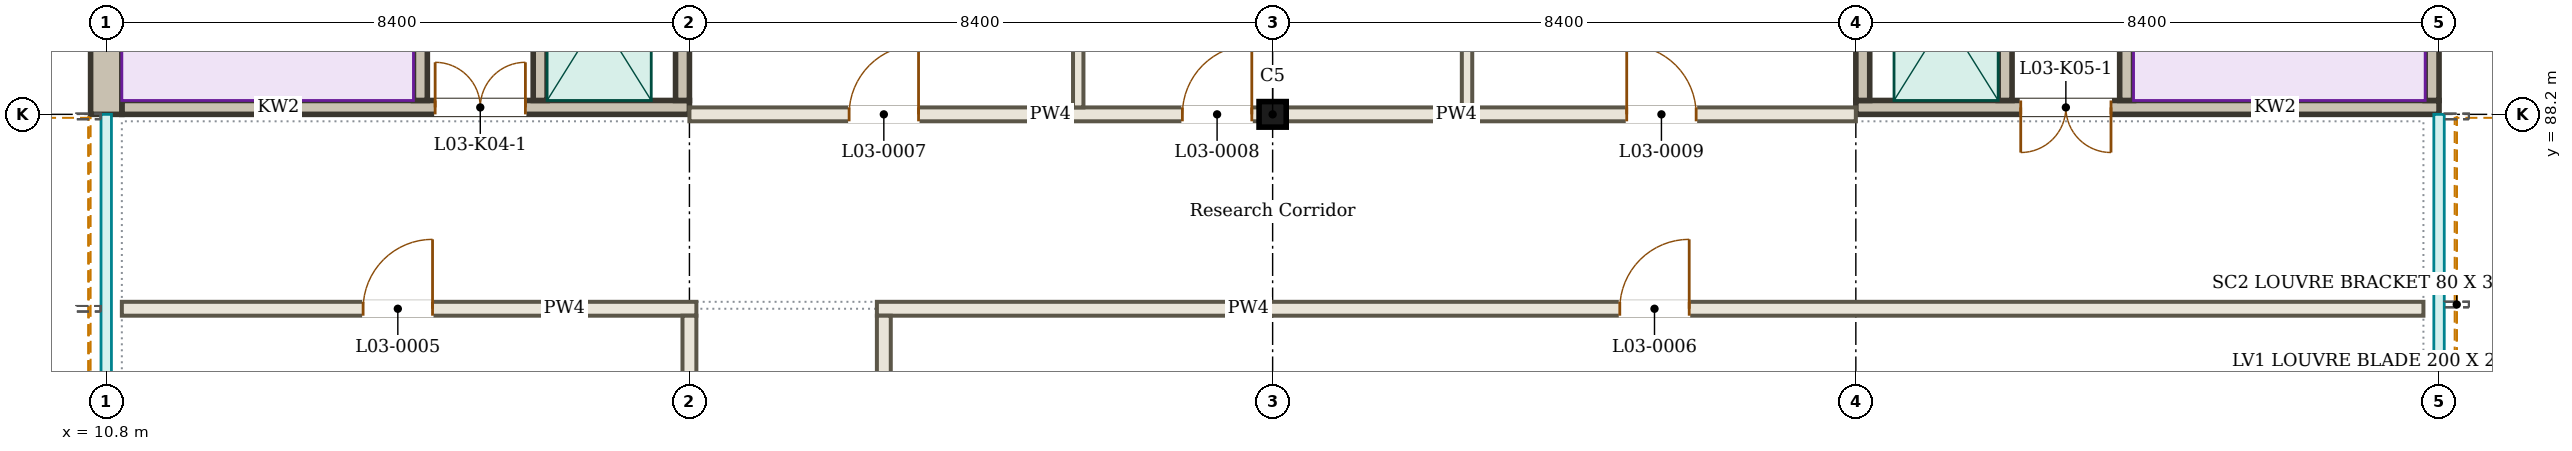
"""IFC4 building model, lengths in metres.
Left out: names, types, materials, properties, quantities, classifications, styles, units other than length and angle.
Written with IfcOpenShell. Run it as: python <this file> out.ifc"""

import sys

from ifc_helpers import new_model, si_unit, direction, frame, frame_2d, origin, origin_2d, place, context, subcontext, project, spatial, rectangle, i_section, extrude, element, fill, save


model = new_model("IFC4")
c1 = context("Model", 3, precision=1e-05, world=origin(), true_north=direction((0.0, 1.0)))
c2 = subcontext(c1, "Body", "Model", "MODEL_VIEW")
j1 = project(units=[si_unit("LENGTHUNIT", "METRE"), si_unit("PLANEANGLEUNIT", "RADIAN")], contexts=[c1])
p1 = place(None, origin())
s1 = spatial("IfcSite", under=j1, at=p1, CompositionType="ELEMENT")
p2 = place(p1, origin())
s2 = spatial("IfcBuilding", under=s1, at=p2, CompositionType="ELEMENT")
p3 = place(p2, frame((0.0, 0.0, 13.5)))
s3 = spatial("IfcBuildingStorey", under=s2, at=p3, CompositionType="ELEMENT", Elevation=13.5)
p4 = place(p3, frame((27.6, 88.2, 0.0), z_axis=(0.0, 0.0, 1.0), x_axis=(1.0, 0.0, 0.0)))
e1 = element("IfcColumn", 1, at=p4, inside=s3, PredefinedType="COLUMN", context=c2, shape_type="SweptSolid", body=[
    extrude(i_section(OverallWidth=0.391, OverallDepth=0.368, WebThickness=0.015, FlangeThickness=0.024, FilletRadius=0.027, at=origin_2d()), origin(), (0.0, 0.0, 1.0), 4.5),
])
p5 = place(p3, frame((44.56, 79.984, 3.87), z_axis=(0.0, 0.0, 1.0), x_axis=(0.0, 1.0, 0.0)))
e2 = element("IfcWall", 2, at=p5, inside=s3, PredefinedType="SOLIDWALL", context=c2, shape_type="SweptSolid", body=[
    extrude(rectangle(XDim=8.216, YDim=0.13, at=frame_2d((4.108, 0.0))), origin(), (0.0, 0.0, 1.0), 0.63),
])
p6 = place(p3, frame((10.64, 79.8, 3.87), z_axis=(0.0, 0.0, 1.0), x_axis=(0.0, 1.0, 0.0)))
e3 = element("IfcWall", 3, at=p6, inside=s3, PredefinedType="SOLIDWALL", context=c2, shape_type="SweptSolid", body=[
    extrude(rectangle(XDim=8.4, YDim=0.13, at=frame_2d((4.2, 0.0))), origin(), (0.0, 0.0, 1.0), 0.63),
])
p7 = place(p3, frame((11.025, 85.4, 0.0), z_axis=(0.0, 0.0, 1.0), x_axis=(1.0, 0.0, 0.0)))
e4 = element("IfcWall", 4, at=p7, inside=s3, PredefinedType="PARTITIONING", context=c2, shape_type="SweptSolid", body=[
    extrude(rectangle(XDim=8.275, YDim=0.2, at=frame_2d((4.138, 0.0))), origin(), (0.0, 0.0, 1.0), 3.8),
])
p8 = place(p7, frame((3.475, 0.0, 0.0)))
e5 = element("IfcOpeningElement", 5, at=p8, cuts=e4, PredefinedType="OPENING", context=c2, shape_type="SweptSolid", body=[
    extrude(rectangle(XDim=1.0, YDim=2.1, at=frame_2d((0.5, 1.05))), frame((0.0, 0.11, 0.0), z_axis=(0.0, -1.0, 0.0), x_axis=(1.0, 0.0, 0.0)), (0.0, 0.0, 1.0), 0.22),
])
p9 = place(p3, frame((21.9, 85.4, 0.0), z_axis=(0.0, 0.0, 1.0), x_axis=(1.0, 0.0, 0.0)))
e6 = element("IfcWall", 6, at=p9, inside=s3, PredefinedType="PARTITIONING", context=c2, shape_type="SweptSolid", body=[
    extrude(rectangle(XDim=22.275, YDim=0.2, at=frame_2d((11.138, 0.0))), origin(), (0.0, 0.0, 1.0), 3.8),
])
p10 = place(p9, frame((10.7, 0.0, 0.0)))
e7 = element("IfcOpeningElement", 7, at=p10, cuts=e6, PredefinedType="OPENING", context=c2, shape_type="SweptSolid", body=[
    extrude(rectangle(XDim=1.0, YDim=2.1, at=frame_2d((0.5, 1.05))), frame((0.0, 0.11, 0.0), z_axis=(0.0, -1.0, 0.0), x_axis=(1.0, 0.0, 0.0)), (0.0, 0.0, 1.0), 0.22),
])
p11 = place(p3, frame((19.2, 88.2, 0.0), z_axis=(0.0, 0.0, 1.0), x_axis=(1.0, 0.0, 0.0)))
e8 = element("IfcWall", 8, at=p11, inside=s3, PredefinedType="PARTITIONING", context=c2, shape_type="SweptSolid", body=[
    extrude(rectangle(XDim=8.205, YDim=0.2, at=frame_2d((4.102, 0.0))), origin(), (0.0, 0.0, 1.0), 3.8),
])
p12 = place(p11, frame((2.3, 0.0, 0.0)))
e9 = element("IfcOpeningElement", 9, at=p12, cuts=e8, PredefinedType="OPENING", context=c2, shape_type="SweptSolid", body=[
    extrude(rectangle(XDim=1.0, YDim=2.1, at=frame_2d((0.5, 1.05))), frame((0.0, 0.11, 0.0), z_axis=(0.0, -1.0, 0.0), x_axis=(1.0, 0.0, 0.0)), (0.0, 0.0, 1.0), 0.22),
])
p13 = place(p11, frame((7.1, 0.0, 0.0)))
e10 = element("IfcOpeningElement", 10, at=p13, cuts=e8, PredefinedType="OPENING", context=c2, shape_type="SweptSolid", body=[
    extrude(rectangle(XDim=1.0, YDim=2.1, at=frame_2d((0.5, 1.05))), frame((0.0, 0.11, 0.0), z_axis=(0.0, -1.0, 0.0), x_axis=(1.0, 0.0, 0.0)), (0.0, 0.0, 1.0), 0.22),
])
p14 = place(p3, frame((27.795, 88.2, 0.0), z_axis=(0.0, 0.0, 1.0), x_axis=(1.0, 0.0, 0.0)))
e11 = element("IfcWall", 11, at=p14, inside=s3, PredefinedType="PARTITIONING", context=c2, shape_type="SweptSolid", body=[
    extrude(rectangle(XDim=8.205, YDim=0.2, at=frame_2d((4.102, 0.0))), origin(), (0.0, 0.0, 1.0), 3.8),
])
p15 = place(p14, frame((4.905, 0.0, 0.0)))
e12 = element("IfcOpeningElement", 12, at=p15, cuts=e11, PredefinedType="OPENING", context=c2, shape_type="SweptSolid", body=[
    extrude(rectangle(XDim=1.0, YDim=2.1, at=frame_2d((0.5, 1.05))), frame((0.0, 0.11, 0.0), z_axis=(0.0, -1.0, 0.0), x_axis=(1.0, 0.0, 0.0)), (0.0, 0.0, 1.0), 0.22),
])
p16 = place(p3, frame((19.2, 82.7, 0.0), z_axis=(0.0, 0.0, 1.0), x_axis=(0.0, 1.0, 0.0)))
e13 = element("IfcWall", 13, at=p16, inside=s3, PredefinedType="PARTITIONING", context=c2, shape_type="SweptSolid", body=[
    extrude(rectangle(XDim=2.6, YDim=0.2, at=frame_2d((1.3, 0.0))), origin(), (0.0, 0.0, 1.0), 3.8),
])
p17 = place(p3, frame((22.0, 79.875, 0.0), z_axis=(0.0, 0.0, 1.0), x_axis=(0.0, 1.0, 0.0)))
e14 = element("IfcWall", 14, at=p17, inside=s3, PredefinedType="PARTITIONING", context=c2, shape_type="SweptSolid", body=[
    extrude(rectangle(XDim=5.425, YDim=0.2, at=frame_2d((2.712, 0.0))), origin(), (0.0, 0.0, 1.0), 3.8),
])
for number, where, z_axis, x_axis in (
    (15, (24.8, 88.3, 0.0), (0.0, 0.0, 1.0), (0.0, 1.0, 0.0)),
    (16, (30.4, 88.3, 0.0), (0.0, 0.0, 1.0), (0.0, 1.0, 0.0)),
):
    element("IfcWall", number, at=place(p3, frame(where, z_axis=z_axis, x_axis=x_axis)), inside=s3, PredefinedType="PARTITIONING", context=c2, shape_type="SweptSolid", body=[
        extrude(rectangle(XDim=8.075, YDim=0.15, at=frame_2d((4.038, 0.0))), origin(), (0.0, 0.0, 1.0), 3.8),
    ])
p18 = place(p3, frame((11.025, 88.3, 0.0), z_axis=(0.0, 0.0, 1.0), x_axis=(1.0, 0.0, 0.0)))
e17 = element("IfcWall", 17, at=p18, inside=s3, PredefinedType="SOLIDWALL", context=c2, shape_type="SweptSolid", body=[
    extrude(rectangle(XDim=8.175, YDim=0.2, at=frame_2d((4.087, 0.0))), origin(), (0.0, 0.0, 1.0), 4.5),
])
p19 = place(p18, frame((4.512, 0.0, 0.0)))
e18 = element("IfcOpeningElement", 18, at=p19, cuts=e17, PredefinedType="OPENING", context=c2, shape_type="SweptSolid", body=[
    extrude(rectangle(XDim=1.3, YDim=2.1, at=frame_2d((0.65, 1.05))), frame((0.0, 0.11, 0.0), z_axis=(0.0, -1.0, 0.0), x_axis=(1.0, 0.0, 0.0)), (0.0, 0.0, 1.0), 0.22),
])
p20 = place(p3, frame((10.8, 88.2, 0.0), z_axis=(0.0, 0.0, 1.0), x_axis=(0.0, 1.0, 0.0)))
e19 = element("IfcWall", 19, at=p20, inside=s3, PredefinedType="SOLIDWALL", context=c2, shape_type="SweptSolid", body=[
    extrude(rectangle(XDim=8.175, YDim=0.45, at=frame_2d((4.087, 0.0))), origin(), (0.0, 0.0, 1.0), 4.5),
])
p21 = place(p3, frame((19.1, 88.4, 0.0), z_axis=(0.0, 0.0, 1.0), x_axis=(0.0, 1.0, 0.0)))
e20 = element("IfcWall", 20, at=p21, inside=s3, PredefinedType="SOLIDWALL", context=c2, shape_type="SweptSolid", body=[
    extrude(rectangle(XDim=7.975, YDim=0.2, at=frame_2d((3.988, 0.0))), origin(), (0.0, 0.0, 1.0), 4.5),
])
p22 = place(p3, frame((15.325, 88.4, 0.0), z_axis=(0.0, 0.0, 1.0), x_axis=(0.0, 1.0, 0.0)))
e21 = element("IfcWall", 21, at=p22, inside=s3, PredefinedType="SOLIDWALL", context=c2, shape_type="SweptSolid", body=[
    extrude(rectangle(XDim=7.975, YDim=0.2, at=frame_2d((3.988, 0.0))), origin(), (0.0, 0.0, 1.0), 4.5),
])
p23 = place(p22, frame((6.538, 0.0, 0.0)))
e22 = element("IfcOpeningElement", 22, at=p23, cuts=e21, PredefinedType="OPENING", context=c2, shape_type="SweptSolid", body=[
    extrude(rectangle(XDim=1.1, YDim=2.1, at=frame_2d((0.55, 1.05))), frame((0.0, 0.11, 0.0), z_axis=(0.0, -1.0, 0.0), x_axis=(1.0, 0.0, 0.0)), (0.0, 0.0, 1.0), 0.22),
])
p24 = place(p3, frame((17.05, 88.4, 0.0), z_axis=(0.0, 0.0, 1.0), x_axis=(0.0, 1.0, 0.0)))
e23 = element("IfcWall", 23, at=p24, inside=s3, PredefinedType="SOLIDWALL", context=c2, shape_type="SweptSolid", body=[
    extrude(rectangle(XDim=2.95, YDim=0.2, at=frame_2d((1.475, 0.0))), origin(), (0.0, 0.0, 1.0), 4.5),
])
p25 = place(p3, frame((44.4, 88.3, 0.0), z_axis=(0.0, 0.0, 1.0), x_axis=(-1.0, 0.0, 0.0)))
e24 = element("IfcWall", 24, at=p25, inside=s3, PredefinedType="SOLIDWALL", context=c2, shape_type="SweptSolid", body=[
    extrude(rectangle(XDim=8.4, YDim=0.2, at=frame_2d((4.2, 0.0))), origin(), (0.0, 0.0, 1.0), 4.5),
])
p26 = place(p25, frame((4.725, 0.0, 0.0)))
e25 = element("IfcOpeningElement", 25, at=p26, cuts=e24, PredefinedType="OPENING", context=c2, shape_type="SweptSolid", body=[
    extrude(rectangle(XDim=1.3, YDim=2.1, at=frame_2d((0.65, 1.05))), frame((0.0, 0.11, 0.0), z_axis=(0.0, -1.0, 0.0), x_axis=(1.0, 0.0, 0.0)), (0.0, 0.0, 1.0), 0.22),
])
for number, where, z_axis, x_axis in (
    (26, (44.3, 88.4, 0.0), (0.0, 0.0, 1.0), (0.0, 1.0, 0.0)),
    (27, (36.1, 88.4, 0.0), (0.0, 0.0, 1.0), (0.0, 1.0, 0.0)),
):
    element("IfcWall", number, at=place(p3, frame(where, z_axis=z_axis, x_axis=x_axis)), inside=s3, PredefinedType="SOLIDWALL", context=c2, shape_type="SweptSolid", body=[
        extrude(rectangle(XDim=7.975, YDim=0.2, at=frame_2d((3.988, 0.0))), origin(), (0.0, 0.0, 1.0), 4.5),
    ])
p27 = place(p3, frame((39.9, 88.4, 0.0), z_axis=(0.0, 0.0, 1.0), x_axis=(0.0, 1.0, 0.0)))
e28 = element("IfcWall", 28, at=p27, inside=s3, PredefinedType="SOLIDWALL", context=c2, shape_type="SweptSolid", body=[
    extrude(rectangle(XDim=7.975, YDim=0.2, at=frame_2d((3.988, 0.0))), origin(), (0.0, 0.0, 1.0), 4.5),
])
p28 = place(p27, frame((6.538, 0.0, 0.0)))
e29 = element("IfcOpeningElement", 29, at=p28, cuts=e28, PredefinedType="OPENING", context=c2, shape_type="SweptSolid", body=[
    extrude(rectangle(XDim=1.1, YDim=2.1, at=frame_2d((0.55, 1.05))), frame((0.0, 0.11, 0.0), z_axis=(0.0, -1.0, 0.0), x_axis=(1.0, 0.0, 0.0)), (0.0, 0.0, 1.0), 0.22),
])
p29 = place(p3, frame((38.15, 88.4, 0.0), z_axis=(0.0, 0.0, 1.0), x_axis=(0.0, 1.0, 0.0)))
e30 = element("IfcWall", 30, at=p29, inside=s3, PredefinedType="SOLIDWALL", context=c2, shape_type="SweptSolid", body=[
    extrude(rectangle(XDim=2.95, YDim=0.2, at=frame_2d((1.475, 0.0))), origin(), (0.0, 0.0, 1.0), 4.5),
])
p30 = place(p8, origin())
e31 = element("IfcDoor", 31, at=p30, inside=s3, OperationType="SINGLE_SWING_RIGHT", PredefinedType="DOOR", context=c2, shape_type="SweptSolid", body=[
    extrude(rectangle(XDim=1.0, YDim=2.1, at=frame_2d((0.5, 1.05))), frame((0.0, 0.025, 0.0), z_axis=(0.0, -1.0, 0.0), x_axis=(1.0, 0.0, 0.0)), (0.0, 0.0, 1.0), 0.05),
])
fill(e5, e31)
p31 = place(p10, origin())
e32 = element("IfcDoor", 32, at=p31, inside=s3, OperationType="SINGLE_SWING_RIGHT", PredefinedType="DOOR", context=c2, shape_type="SweptSolid", body=[
    extrude(rectangle(XDim=1.0, YDim=2.1, at=frame_2d((0.5, 1.05))), frame((0.0, 0.025, 0.0), z_axis=(0.0, -1.0, 0.0), x_axis=(1.0, 0.0, 0.0)), (0.0, 0.0, 1.0), 0.05),
])
fill(e7, e32)
p32 = place(p12, origin())
e33 = element("IfcDoor", 33, at=p32, inside=s3, OperationType="SINGLE_SWING_RIGHT", PredefinedType="DOOR", context=c2, shape_type="SweptSolid", body=[
    extrude(rectangle(XDim=1.0, YDim=2.1, at=frame_2d((0.5, 1.05))), frame((0.0, 0.025, 0.0), z_axis=(0.0, -1.0, 0.0), x_axis=(1.0, 0.0, 0.0)), (0.0, 0.0, 1.0), 0.05),
])
fill(e9, e33)
p33 = place(p13, origin())
e34 = element("IfcDoor", 34, at=p33, inside=s3, OperationType="SINGLE_SWING_RIGHT", PredefinedType="DOOR", context=c2, shape_type="SweptSolid", body=[
    extrude(rectangle(XDim=1.0, YDim=2.1, at=frame_2d((0.5, 1.05))), frame((0.0, 0.025, 0.0), z_axis=(0.0, -1.0, 0.0), x_axis=(1.0, 0.0, 0.0)), (0.0, 0.0, 1.0), 0.05),
])
fill(e10, e34)
p34 = place(p15, origin())
e35 = element("IfcDoor", 35, at=p34, inside=s3, OperationType="SINGLE_SWING_LEFT", PredefinedType="DOOR", context=c2, shape_type="SweptSolid", body=[
    extrude(rectangle(XDim=1.0, YDim=2.1, at=frame_2d((0.5, 1.05))), frame((0.0, 0.025, 0.0), z_axis=(0.0, -1.0, 0.0), x_axis=(1.0, 0.0, 0.0)), (0.0, 0.0, 1.0), 0.05),
])
fill(e12, e35)
p35 = place(p19, origin())
e36 = element("IfcDoor", 36, at=p35, inside=s3, OperationType="DOUBLE_DOOR_DOUBLE_SWING", PredefinedType="DOOR", context=c2, shape_type="SweptSolid", body=[
    extrude(rectangle(XDim=1.3, YDim=2.1, at=frame_2d((0.65, 1.05))), frame((0.0, 0.025, 0.0), z_axis=(0.0, -1.0, 0.0), x_axis=(1.0, 0.0, 0.0)), (0.0, 0.0, 1.0), 0.05),
])
fill(e18, e36)
p36 = place(p26, origin())
e37 = element("IfcDoor", 37, at=p36, inside=s3, OperationType="DOUBLE_DOOR_DOUBLE_SWING", PredefinedType="DOOR", context=c2, shape_type="SweptSolid", body=[
    extrude(rectangle(XDim=1.3, YDim=2.1, at=frame_2d((0.65, 1.05))), frame((0.0, 0.025, 0.0), z_axis=(0.0, -1.0, 0.0), x_axis=(1.0, 0.0, 0.0)), (0.0, 0.0, 1.0), 0.05),
])
fill(e25, e37)
save(model, sys.argv[1])
